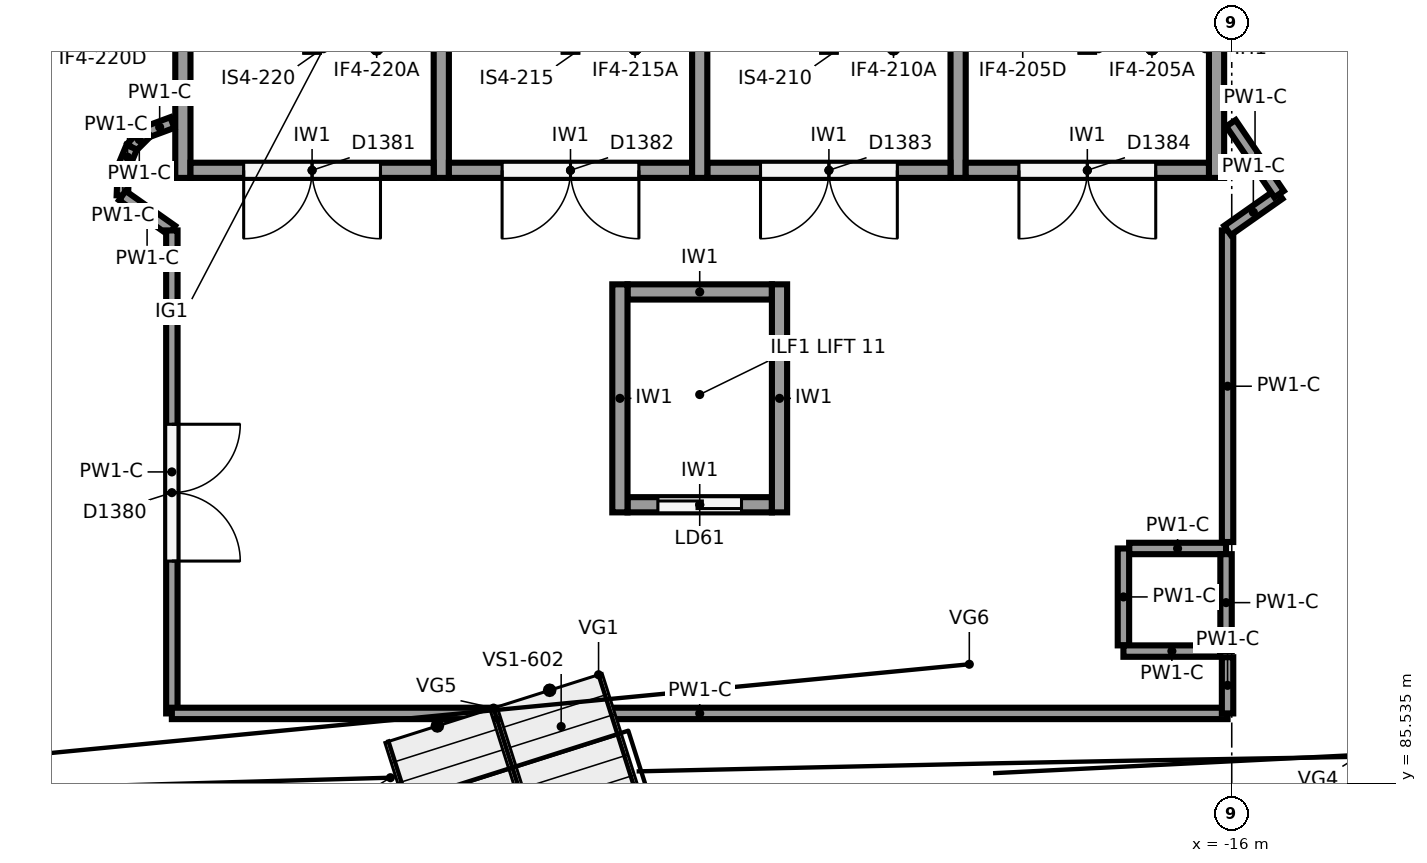
"""IFC4 building model, lengths in metres.
Left out: names, types, materials, properties, quantities, classifications, styles, units other than length and angle.
Written with IfcOpenShell. Run it as: python <this file> out.ifc"""

import sys

from ifc_helpers import new_model, si_unit, direction, frame, frame_2d, origin, origin_2d, place, context, subcontext, project, spatial, rectangle, circle, extrude, element, fill, save


model = new_model("IFC4")
c1 = context("Model", 3, precision=1e-05, world=origin(), true_north=direction((0.0, 1.0)))
c2 = subcontext(c1, "Body", "Model", "MODEL_VIEW")
j1 = project(units=[si_unit("LENGTHUNIT", "METRE"), si_unit("PLANEANGLEUNIT", "RADIAN")], contexts=[c1])
p1 = place(None, origin())
s1 = spatial("IfcSite", under=j1, at=p1, CompositionType="ELEMENT")
p2 = place(p1, origin())
s2 = spatial("IfcBuilding", under=s1, at=p2, CompositionType="ELEMENT")
p3 = place(p2, frame((0.0, 0.0, 18.0)))
s3 = spatial("IfcBuildingStorey", under=s2, at=p3, CompositionType="ELEMENT", Elevation=18.0)
p4 = place(p3, frame((-19.119, 85.698, 0.0), z_axis=(0.0, 0.0, 1.0), x_axis=(1.0, 0.0, 0.0)))
e1 = element("IfcColumn", 1, at=p4, inside=s3, PredefinedType="COLUMN", context=c2, shape_type="SweptSolid", body=[
    extrude(circle(Radius=0.4, at=origin_2d()), origin(), (0.0, 0.0, 1.0), 4.153),
])
p5 = place(p3, frame((-19.627, 89.904, 0.0), z_axis=(0.0, 0.0, 1.0), x_axis=(1.0, 0.0, 0.0)))
e2 = element("IfcColumn", 2, at=p5, inside=s3, PredefinedType="COLUMN", context=c2, shape_type="SweptSolid", body=[
    extrude(circle(Radius=0.55, at=origin_2d()), origin(), (0.0, 0.0, 1.0), 6.0),
])
p6 = place(p3, frame((-31.737, 85.377, 0.0), z_axis=(0.0, 0.0, 1.0), x_axis=(1.0, 0.0, 0.0)))
e3 = element("IfcColumn", 3, at=p6, inside=s3, PredefinedType="COLUMN", context=c2, shape_type="SweptSolid", body=[
    extrude(circle(Radius=0.4, at=origin_2d()), origin(), (0.0, 0.0, 1.0), 4.687),
])
for number, where, z_axis, x_axis in (
    (4, (-16.2, 102.3, 0.0), (0.0, 0.0, 1.0), (0.0, -1.0, 0.0)),
    (5, (-23.0, 102.3, 0.0), (0.0, 0.0, 1.0), (0.0, -1.0, 0.0)),
    (6, (-29.8, 102.3, 0.0), (0.0, 0.0, 1.0), (0.0, -1.0, 0.0)),
    (7, (-19.6, 102.3, 0.0), (0.0, 0.0, 1.0), (0.0, -1.0, 0.0)),
    (8, (-26.4, 102.3, 0.0), (0.0, 0.0, 1.0), (0.0, -1.0, 0.0)),
):
    element("IfcWall", number, at=place(p3, frame(where, z_axis=z_axis, x_axis=x_axis)), inside=s3, PredefinedType="SHEAR", context=c2, shape_type="SweptSolid", body=[
        extrude(rectangle(XDim=8.8, YDim=0.2, at=frame_2d((4.4, 0.0))), origin(), (0.0, 0.0, 1.0), 5.6),
    ])
p7 = place(p3, frame((-16.3, 93.6, 0.0), z_axis=(0.0, 0.0, 1.0), x_axis=(-1.0, 0.0, 0.0)))
e9 = element("IfcWall", 9, at=p7, inside=s3, PredefinedType="SHEAR", context=c2, shape_type="SweptSolid", body=[
    extrude(rectangle(XDim=3.2, YDim=0.2, at=frame_2d((1.6, 0.0))), origin(), (0.0, 0.0, 1.0), 5.6),
])
p8 = place(p7, frame((0.7, 0.0, 0.0)))
e10 = element("IfcOpeningElement", 10, at=p8, cuts=e9, PredefinedType="OPENING", context=c2, shape_type="SweptSolid", body=[
    extrude(rectangle(XDim=1.8, YDim=2.1, at=frame_2d((0.9, 1.05))), frame((0.0, 0.11, 0.0), z_axis=(0.0, -1.0, 0.0), x_axis=(1.0, 0.0, 0.0)), (0.0, 0.0, 1.0), 0.22),
])
p9 = place(p3, frame((-19.7, 93.6, 0.0), z_axis=(0.0, 0.0, 1.0), x_axis=(-1.0, 0.0, 0.0)))
e11 = element("IfcWall", 11, at=p9, inside=s3, PredefinedType="SHEAR", context=c2, shape_type="SweptSolid", body=[
    extrude(rectangle(XDim=3.2, YDim=0.2, at=frame_2d((1.6, 0.0))), origin(), (0.0, 0.0, 1.0), 5.6),
])
p10 = place(p9, frame((0.7, 0.0, 0.0)))
e12 = element("IfcOpeningElement", 12, at=p10, cuts=e11, PredefinedType="OPENING", context=c2, shape_type="SweptSolid", body=[
    extrude(rectangle(XDim=1.8, YDim=2.1, at=frame_2d((0.9, 1.05))), frame((0.0, 0.11, 0.0), z_axis=(0.0, -1.0, 0.0), x_axis=(1.0, 0.0, 0.0)), (0.0, 0.0, 1.0), 0.22),
])
p11 = place(p3, frame((-23.1, 93.6, 0.0), z_axis=(0.0, 0.0, 1.0), x_axis=(-1.0, 0.0, 0.0)))
e13 = element("IfcWall", 13, at=p11, inside=s3, PredefinedType="SHEAR", context=c2, shape_type="SweptSolid", body=[
    extrude(rectangle(XDim=3.2, YDim=0.2, at=frame_2d((1.6, 0.0))), origin(), (0.0, 0.0, 1.0), 5.6),
])
p12 = place(p11, frame((0.7, 0.0, 0.0)))
e14 = element("IfcOpeningElement", 14, at=p12, cuts=e13, PredefinedType="OPENING", context=c2, shape_type="SweptSolid", body=[
    extrude(rectangle(XDim=1.8, YDim=2.1, at=frame_2d((0.9, 1.05))), frame((0.0, 0.11, 0.0), z_axis=(0.0, -1.0, 0.0), x_axis=(1.0, 0.0, 0.0)), (0.0, 0.0, 1.0), 0.22),
])
p13 = place(p3, frame((-26.5, 93.6, 0.0), z_axis=(0.0, 0.0, 1.0), x_axis=(-1.0, 0.0, 0.0)))
e15 = element("IfcWall", 15, at=p13, inside=s3, PredefinedType="SHEAR", context=c2, shape_type="SweptSolid", body=[
    extrude(rectangle(XDim=3.2, YDim=0.2, at=frame_2d((1.6, 0.0))), origin(), (0.0, 0.0, 1.0), 5.6),
])
p14 = place(p13, frame((0.7, 0.0, 0.0)))
e16 = element("IfcOpeningElement", 16, at=p14, cuts=e15, PredefinedType="OPENING", context=c2, shape_type="SweptSolid", body=[
    extrude(rectangle(XDim=1.8, YDim=2.1, at=frame_2d((0.9, 1.05))), frame((0.0, 0.11, 0.0), z_axis=(0.0, -1.0, 0.0), x_axis=(1.0, 0.0, 0.0)), (0.0, 0.0, 1.0), 0.22),
])
for number, where, z_axis, x_axis in (
    (17, (-21.95, 92.1, 0.0), (0.0, 0.0, 1.0), (0.0, -1.0, 0.0)),
    (18, (-24.05, 92.1, 0.0), (0.0, 0.0, 1.0), (0.0, -1.0, 0.0)),
):
    element("IfcWall", number, at=place(p3, frame(where, z_axis=z_axis, x_axis=x_axis)), inside=s3, PredefinedType="SHEAR", context=c2, shape_type="SweptSolid", body=[
        extrude(rectangle(XDim=3.0, YDim=0.2, at=frame_2d((1.5, 0.0))), origin(), (0.0, 0.0, 1.0), 5.6),
    ])
p15 = place(p3, frame((-22.05, 92.0, 0.0), z_axis=(0.0, 0.0, 1.0), x_axis=(-1.0, 0.0, 0.0)))
e19 = element("IfcWall", 19, at=p15, inside=s3, PredefinedType="SHEAR", context=c2, shape_type="SweptSolid", body=[
    extrude(rectangle(XDim=1.9, YDim=0.2, at=frame_2d((0.95, 0.0))), origin(), (0.0, 0.0, 1.0), 5.6),
])
p16 = place(p3, frame((-22.05, 89.2, 0.0), z_axis=(0.0, 0.0, 1.0), x_axis=(-1.0, 0.0, 0.0)))
e20 = element("IfcWall", 20, at=p16, inside=s3, PredefinedType="SHEAR", context=c2, shape_type="SweptSolid", body=[
    extrude(rectangle(XDim=1.9, YDim=0.2, at=frame_2d((0.95, 0.0))), origin(), (0.0, 0.0, 1.0), 5.6),
])
p17 = place(p16, frame((0.4, 0.0, 0.0)))
e21 = element("IfcOpeningElement", 21, at=p17, cuts=e20, PredefinedType="OPENING", context=c2, shape_type="SweptSolid", body=[
    extrude(rectangle(XDim=1.1, YDim=2.1, at=frame_2d((0.55, 1.05))), frame((0.0, 0.11, 0.0), z_axis=(0.0, -1.0, 0.0), x_axis=(1.0, 0.0, 0.0)), (0.0, 0.0, 1.0), 0.22),
])
p18 = place(p3, frame((-16.075, 88.625, 0.0), z_axis=(0.0, 0.0, 1.0), x_axis=(-1.0, 0.0, 0.0)))
e22 = element("IfcWall", 22, at=p18, inside=s3, PredefinedType="PARTITIONING", context=c2, shape_type="SweptSolid", body=[
    extrude(rectangle(XDim=1.275, YDim=0.15, at=frame_2d((0.638, 0.0))), origin(), (0.0, 0.0, 1.0), 2.905),
])
p19 = place(p3, frame((-17.425, 88.625, 0.0), z_axis=(0.0, 0.0, 1.0), x_axis=(0.0, -1.0, 0.0)))
e23 = element("IfcWall", 23, at=p19, inside=s3, PredefinedType="PARTITIONING", context=c2, shape_type="SweptSolid", body=[
    extrude(rectangle(XDim=1.275, YDim=0.15, at=frame_2d((0.637, 0.0))), origin(), (0.0, 0.0, 1.0), 2.905),
])
for number, where, z_axis, x_axis in (
    (24, (-17.425, 87.275, 0.0), (0.0, 0.0, 1.0), (1.0, 0.0, 0.0)),
    (25, (-16.075, 87.275, 0.0), (0.0, 0.0, 1.0), (0.0, 1.0, 0.0)),
):
    element("IfcWall", number, at=place(p3, frame(where, z_axis=z_axis, x_axis=x_axis)), inside=s3, PredefinedType="PARTITIONING", context=c2, shape_type="SweptSolid", body=[
        extrude(rectangle(XDim=1.275, YDim=0.15, at=frame_2d((0.638, 0.0))), origin(), (0.0, 0.0, 1.0), 2.905),
    ])
p20 = place(p3, frame((-29.938, 94.229, 0.0), z_axis=(0.0, 0.0, 1.0), x_axis=(-0.937674325327, -0.347515265308, 0.0)))
e26 = element("IfcWall", 26, at=p20, inside=s3, PredefinedType="PARTITIONING", context=c2, shape_type="SweptSolid", body=[
    extrude(rectangle(XDim=0.356, YDim=0.15, at=frame_2d((0.178, 0.0))), origin(), (0.0, 0.0, 1.0), 2.905),
])
p21 = place(p3, frame((-30.272, 94.105, 0.0), z_axis=(0.0, 0.0, 1.0), x_axis=(-0.707534941396, -0.706678361564, 0.0)))
e27 = element("IfcWall", 27, at=p21, inside=s3, PredefinedType="PARTITIONING", context=c2, shape_type="SweptSolid", body=[
    extrude(rectangle(XDim=0.285, YDim=0.15, at=frame_2d((0.143, 0.0))), origin(), (0.0, 0.0, 1.0), 2.905),
])
p22 = place(p3, frame((-30.474, 93.904, 0.0), z_axis=(0.0, 0.0, 1.0), x_axis=(-0.382275228123, -0.924048510611, 0.0)))
e28 = element("IfcWall", 28, at=p22, inside=s3, PredefinedType="PARTITIONING", context=c2, shape_type="SweptSolid", body=[
    extrude(rectangle(XDim=0.282, YDim=0.15, at=frame_2d((0.141, 0.0))), origin(), (0.0, 0.0, 1.0), 2.905),
])
p23 = place(p3, frame((-30.582, 93.643, 0.0), z_axis=(0.0, 0.0, 1.0), x_axis=(-0.038982051143, -0.999239910977, 0.0)))
e29 = element("IfcWall", 29, at=p23, inside=s3, PredefinedType="PARTITIONING", context=c2, shape_type="SweptSolid", body=[
    extrude(rectangle(XDim=0.376, YDim=0.15, at=frame_2d((0.188, 0.0))), origin(), (0.0, 0.0, 1.0), 2.905),
])
p24 = place(p3, frame((-30.596, 93.268, 0.0), z_axis=(0.0, 0.0, 1.0), x_axis=(0.817731616096, -0.57559969079, 0.0)))
e30 = element("IfcWall", 30, at=p24, inside=s3, PredefinedType="PARTITIONING", context=c2, shape_type="SweptSolid", body=[
    extrude(rectangle(XDim=0.797, YDim=0.15, at=frame_2d((0.398, 0.0))), origin(), (0.0, 0.0, 1.0), 2.905),
])
p25 = place(p3, frame((-29.945, 92.809, 0.0), z_axis=(0.0, 0.0, 1.0), x_axis=(0.0, -1.0, 0.0)))
e31 = element("IfcWall", 31, at=p25, inside=s3, PredefinedType="PARTITIONING", context=c2, shape_type="SweptSolid", body=[
    extrude(rectangle(XDim=6.354, YDim=0.15, at=frame_2d((3.177, 0.0))), origin(), (0.0, 0.0, 1.0), 2.905),
])
p26 = place(p25, frame((2.55, 0.0, 0.0)))
e32 = element("IfcOpeningElement", 32, at=p26, cuts=e31, PredefinedType="OPENING", context=c2, shape_type="SweptSolid", body=[
    extrude(rectangle(XDim=1.8, YDim=2.1, at=frame_2d((0.9, 1.05))), frame((0.0, 0.085, 0.0), z_axis=(0.0, -1.0, 0.0), x_axis=(1.0, 0.0, 0.0)), (0.0, 0.0, 1.0), 0.17),
])
p27 = place(p3, frame((-29.945, 86.455, 0.0), z_axis=(0.0, 0.0, 1.0), x_axis=(1.0, 0.0, 0.0)))
e33 = element("IfcWall", 33, at=p27, inside=s3, PredefinedType="PARTITIONING", context=c2, shape_type="SweptSolid", body=[
    extrude(rectangle(XDim=13.89, YDim=0.15, at=frame_2d((6.945, 0.0))), origin(), (0.0, 0.0, 1.0), 2.905),
])
p28 = place(p3, frame((-16.055, 86.455, 0.0), z_axis=(0.0, 0.0, 1.0), x_axis=(0.0, 1.0, 0.0)))
e34 = element("IfcWall", 34, at=p28, inside=s3, PredefinedType="PARTITIONING", context=c2, shape_type="SweptSolid", body=[
    extrude(rectangle(XDim=0.739, YDim=0.15, at=frame_2d((0.37, 0.0))), origin(), (0.0, 0.0, 1.0), 2.905),
])
p29 = place(p3, frame((-16.055, 88.71, 0.0), z_axis=(0.0, 0.0, 1.0), x_axis=(0.0, 1.0, 0.0)))
e35 = element("IfcWall", 35, at=p29, inside=s3, PredefinedType="PARTITIONING", context=c2, shape_type="SweptSolid", body=[
    extrude(rectangle(XDim=4.099, YDim=0.15, at=frame_2d((2.05, 0.0))), origin(), (0.0, 0.0, 1.0), 2.905),
])
p30 = place(p3, frame((-16.055, 92.809, 0.0), z_axis=(0.0, 0.0, 1.0), x_axis=(0.81774999294, 0.575573582652, 0.0)))
e36 = element("IfcWall", 36, at=p30, inside=s3, PredefinedType="PARTITIONING", context=c2, shape_type="SweptSolid", body=[
    extrude(rectangle(XDim=0.83, YDim=0.15, at=frame_2d((0.415, 0.0))), origin(), (0.0, 0.0, 1.0), 2.905),
])
p31 = place(p3, frame((-15.376, 93.287, 0.0), z_axis=(0.0, 0.0, 1.0), x_axis=(-0.562120553728, 0.827055308354, 0.0)))
e37 = element("IfcWall", 37, at=p31, inside=s3, PredefinedType="PARTITIONING", context=c2, shape_type="SweptSolid", body=[
    extrude(rectangle(XDim=1.128, YDim=0.15, at=frame_2d((0.564, 0.0))), origin(), (0.0, 0.0, 1.0), 2.905),
])
p32 = place(p8, origin())
e38 = element("IfcDoor", 38, at=p32, inside=s3, OperationType="DOUBLE_DOOR_SINGLE_SWING", PredefinedType="DOOR", context=c2, shape_type="SweptSolid", body=[
    extrude(rectangle(XDim=1.8, YDim=2.1, at=frame_2d((0.9, 1.05))), frame((0.0, 0.025, 0.0), z_axis=(0.0, -1.0, 0.0), x_axis=(1.0, 0.0, 0.0)), (0.0, 0.0, 1.0), 0.05),
])
fill(e10, e38)
p33 = place(p10, origin())
e39 = element("IfcDoor", 39, at=p33, inside=s3, OperationType="DOUBLE_DOOR_SINGLE_SWING", PredefinedType="DOOR", context=c2, shape_type="SweptSolid", body=[
    extrude(rectangle(XDim=1.8, YDim=2.1, at=frame_2d((0.9, 1.05))), frame((0.0, 0.025, 0.0), z_axis=(0.0, -1.0, 0.0), x_axis=(1.0, 0.0, 0.0)), (0.0, 0.0, 1.0), 0.05),
])
fill(e12, e39)
p34 = place(p12, origin())
e40 = element("IfcDoor", 40, at=p34, inside=s3, OperationType="DOUBLE_DOOR_SINGLE_SWING", PredefinedType="DOOR", context=c2, shape_type="SweptSolid", body=[
    extrude(rectangle(XDim=1.8, YDim=2.1, at=frame_2d((0.9, 1.05))), frame((0.0, 0.025, 0.0), z_axis=(0.0, -1.0, 0.0), x_axis=(1.0, 0.0, 0.0)), (0.0, 0.0, 1.0), 0.05),
])
fill(e14, e40)
p35 = place(p14, origin())
e41 = element("IfcDoor", 41, at=p35, inside=s3, OperationType="DOUBLE_DOOR_SINGLE_SWING", PredefinedType="DOOR", context=c2, shape_type="SweptSolid", body=[
    extrude(rectangle(XDim=1.8, YDim=2.1, at=frame_2d((0.9, 1.05))), frame((0.0, 0.025, 0.0), z_axis=(0.0, -1.0, 0.0), x_axis=(1.0, 0.0, 0.0)), (0.0, 0.0, 1.0), 0.05),
])
fill(e16, e41)
p36 = place(p17, origin())
e42 = element("IfcDoor", 42, at=p36, inside=s3, OperationType="SLIDING_TO_LEFT", PredefinedType="DOOR", context=c2, shape_type="SweptSolid", body=[
    extrude(rectangle(XDim=1.1, YDim=2.1, at=frame_2d((0.55, 1.05))), frame((0.0, 0.025, 0.0), z_axis=(0.0, -1.0, 0.0), x_axis=(1.0, 0.0, 0.0)), (0.0, 0.0, 1.0), 0.05),
])
fill(e21, e42)
p37 = place(p26, origin())
e43 = element("IfcDoor", 43, at=p37, inside=s3, OperationType="DOUBLE_DOOR_SINGLE_SWING", PredefinedType="DOOR", context=c2, shape_type="SweptSolid", body=[
    extrude(rectangle(XDim=1.8, YDim=2.1, at=frame_2d((0.9, 1.05))), frame((0.0, 0.025, 0.0), z_axis=(0.0, -1.0, 0.0), x_axis=(1.0, 0.0, 0.0)), (0.0, 0.0, 1.0), 0.05),
])
fill(e32, e43)
save(model, sys.argv[1])
